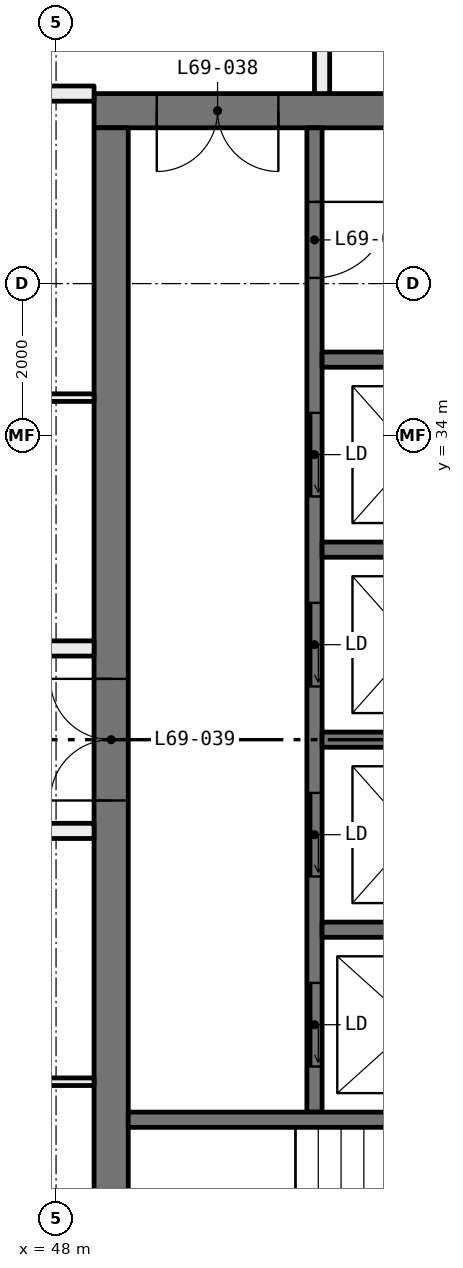
"""IFC4 building model, lengths in metres.
Left out: names, types, materials, properties, quantities, classifications, styles, units other than length and angle.
Written with IfcOpenShell. Run it as: python <this file> out.ifc"""

import sys

from ifc_helpers import new_model, si_unit, direction, frame, frame_2d, origin, place, context, subcontext, project, spatial, rectangle, extrude, element, fill, save


model = new_model("IFC4")
c1 = context("Model", 3, precision=1e-05, world=origin(), true_north=direction((0.0, 1.0)))
c2 = subcontext(c1, "Body", "Model", "MODEL_VIEW")
j1 = project(units=[si_unit("LENGTHUNIT", "METRE"), si_unit("PLANEANGLEUNIT", "RADIAN")], contexts=[c1])
p1 = place(None, origin())
s1 = spatial("IfcSite", under=j1, at=p1, CompositionType="ELEMENT")
p2 = place(p1, origin())
s2 = spatial("IfcBuilding", under=s1, at=p2, CompositionType="ELEMENT")
p3 = place(p2, frame((0.0, 0.0, 255.9)))
s3 = spatial("IfcBuildingStorey", under=s2, at=p3, CompositionType="ELEMENT", Elevation=255.9)
p4 = place(p3, frame((48.5, 25.5, 0.0), z_axis=(0.0, 0.0, 1.0), x_axis=(-1.0, 0.0, 0.0)))
e1 = element("IfcWall", 1, at=p4, inside=s3, PredefinedType="PARTITIONING", context=c2, shape_type="SweptSolid", body=[
    extrude(rectangle(XDim=6.45, YDim=0.1, at=frame_2d((3.225, 0.0))), origin(), (0.0, 0.0, 1.0), 3.05),
])
p5 = place(p4, frame((2.775, 0.0, 0.0)))
e2 = element("IfcOpeningElement", 2, at=p5, cuts=e1, PredefinedType="OPENING", context=c2, shape_type="SweptSolid", body=[
    extrude(rectangle(XDim=0.9, YDim=2.1, at=frame_2d((0.45, 1.05))), frame((0.0, 0.06, 0.0), z_axis=(0.0, -1.0, 0.0), x_axis=(1.0, 0.0, 0.0)), (0.0, 0.0, 1.0), 0.12),
])
p6 = place(p3, frame((48.5, 28.8, 0.0), z_axis=(0.0, 0.0, 1.0), x_axis=(-1.0, 0.0, 0.0)))
e3 = element("IfcWall", 3, at=p6, inside=s3, PredefinedType="PARTITIONING", context=c2, shape_type="SweptSolid", body=[
    extrude(rectangle(XDim=2.4, YDim=0.2, at=frame_2d((1.2, 0.0))), origin(), (0.0, 0.0, 1.0), 3.05),
])
p7 = place(p3, frame((51.5, 41.9, 0.0), z_axis=(0.0, 0.0, 1.0), x_axis=(0.0, -1.0, 0.0)))
e4 = element("IfcWall", 4, at=p7, inside=s3, PredefinedType="PARTITIONING", context=c2, shape_type="SweptSolid", body=[
    extrude(rectangle(XDim=3.4, YDim=0.2, at=frame_2d((1.7, 0.0))), origin(), (0.0, 0.0, 1.0), 3.05),
])
p8 = place(p7, frame((1.2, 0.0, 0.0)))
e5 = element("IfcOpeningElement", 5, at=p8, cuts=e4, PredefinedType="OPENING", context=c2, shape_type="SweptSolid", body=[
    extrude(rectangle(XDim=1.0, YDim=2.1, at=frame_2d((0.5, 1.05))), frame((0.0, 0.11, 0.0), z_axis=(0.0, -1.0, 0.0), x_axis=(1.0, 0.0, 0.0)), (0.0, 0.0, 1.0), 0.22),
])
p9 = place(p3, frame((42.05, 34.5, 0.0), z_axis=(0.0, 0.0, 1.0), x_axis=(1.0, 0.0, 0.0)))
e6 = element("IfcWall", 6, at=p9, inside=s3, PredefinedType="PARTITIONING", context=c2, shape_type="SweptSolid", body=[
    extrude(rectangle(XDim=6.45, YDim=0.1, at=frame_2d((3.225, 0.0))), origin(), (0.0, 0.0, 1.0), 3.05),
])
p10 = place(p9, frame((2.775, 0.0, 0.0)))
e7 = element("IfcOpeningElement", 7, at=p10, cuts=e6, PredefinedType="OPENING", context=c2, shape_type="SweptSolid", body=[
    extrude(rectangle(XDim=0.9, YDim=2.1, at=frame_2d((0.45, 1.05))), frame((0.0, 0.06, 0.0), z_axis=(0.0, -1.0, 0.0), x_axis=(1.0, 0.0, 0.0)), (0.0, 0.0, 1.0), 0.12),
])
p11 = place(p3, frame((48.5, 38.5, 0.0), z_axis=(0.0, 0.0, 1.0), x_axis=(-1.0, 0.0, 0.0)))
e8 = element("IfcWall", 8, at=p11, inside=s3, PredefinedType="PARTITIONING", context=c2, shape_type="SweptSolid", body=[
    extrude(rectangle(XDim=2.4, YDim=0.2, at=frame_2d((1.2, 0.0))), origin(), (0.0, 0.0, 1.0), 3.05),
])
p12 = place(p3, frame((46.2, 31.2, 0.0), z_axis=(0.0, 0.0, 1.0), x_axis=(1.0, 0.0, 0.0)))
e9 = element("IfcWall", 9, at=p12, inside=s3, PredefinedType="PARTITIONING", context=c2, shape_type="SweptSolid", body=[
    extrude(rectangle(XDim=2.3, YDim=0.2, at=frame_2d((1.15, 0.0))), origin(), (0.0, 0.0, 1.0), 3.05),
])
p13 = place(p3, frame((59.5, 38.275, 0.0), z_axis=(0.0, 0.0, 1.0), x_axis=(-1.0, 0.0, 0.0)))
e10 = element("IfcWall", 10, at=p13, inside=s3, PredefinedType="SHEAR", context=c2, shape_type="SweptSolid", body=[
    extrude(rectangle(XDim=11.0, YDim=0.45, at=frame_2d((5.5, 0.0))), origin(), (0.0, 0.0, 1.0), 3.05),
])
p14 = place(p13, frame((8.575, 0.0, 0.0)))
e11 = element("IfcOpeningElement", 11, at=p14, cuts=e10, PredefinedType="OPENING", context=c2, shape_type="SweptSolid", body=[
    extrude(rectangle(XDim=1.6, YDim=2.1, at=frame_2d((0.8, 1.05))), frame((0.0, 0.235, 0.0), z_axis=(0.0, -1.0, 0.0), x_axis=(1.0, 0.0, 0.0)), (0.0, 0.0, 1.0), 0.47),
])
p15 = place(p3, frame((48.725, 21.95, 0.0), z_axis=(0.0, 0.0, 1.0), x_axis=(0.0, 1.0, 0.0)))
e12 = element("IfcWall", 12, at=p15, inside=s3, PredefinedType="SHEAR", context=c2, shape_type="SweptSolid", body=[
    extrude(rectangle(XDim=16.1, YDim=0.45, at=frame_2d((8.05, 0.0))), origin(), (0.0, 0.0, 1.0), 3.05),
])
p16 = place(p15, frame((7.25, 0.0, 0.0)))
e13 = element("IfcOpeningElement", 13, at=p16, cuts=e12, PredefinedType="OPENING", context=c2, shape_type="SweptSolid", body=[
    extrude(rectangle(XDim=1.6, YDim=2.1, at=frame_2d((0.8, 1.05))), frame((0.0, 0.235, 0.0), z_axis=(0.0, -1.0, 0.0), x_axis=(1.0, 0.0, 0.0)), (0.0, 0.0, 1.0), 0.47),
])
p17 = place(p3, frame((51.4, 25.1, 0.0), z_axis=(0.0, 0.0, 1.0), x_axis=(0.0, 1.0, 0.0)))
e14 = element("IfcWall", 14, at=p17, inside=s3, PredefinedType="SOLIDWALL", context=c2, shape_type="SweptSolid", body=[
    extrude(rectangle(XDim=12.95, YDim=0.2, at=frame_2d((6.475, 0.0))), origin(), (0.0, 0.0, 1.0), 3.05),
])
p18 = place(p17, frame((0.6, 0.0, 0.0)))
e15 = element("IfcOpeningElement", 15, at=p18, cuts=e14, PredefinedType="OPENING", context=c2, shape_type="SweptSolid", body=[
    extrude(rectangle(XDim=1.1, YDim=2.1, at=frame_2d((0.55, 1.05))), frame((0.0, 0.11, 0.0), z_axis=(0.0, -1.0, 0.0), x_axis=(1.0, 0.0, 0.0)), (0.0, 0.0, 1.0), 0.22),
])
p19 = place(p17, frame((3.1, 0.0, 0.0)))
e16 = element("IfcOpeningElement", 16, at=p19, cuts=e14, PredefinedType="OPENING", context=c2, shape_type="SweptSolid", body=[
    extrude(rectangle(XDim=1.1, YDim=2.1, at=frame_2d((0.55, 1.05))), frame((0.0, 0.11, 0.0), z_axis=(0.0, -1.0, 0.0), x_axis=(1.0, 0.0, 0.0)), (0.0, 0.0, 1.0), 0.22),
])
p20 = place(p17, frame((5.6, 0.0, 0.0)))
e17 = element("IfcOpeningElement", 17, at=p20, cuts=e14, PredefinedType="OPENING", context=c2, shape_type="SweptSolid", body=[
    extrude(rectangle(XDim=1.1, YDim=2.1, at=frame_2d((0.55, 1.05))), frame((0.0, 0.11, 0.0), z_axis=(0.0, -1.0, 0.0), x_axis=(1.0, 0.0, 0.0)), (0.0, 0.0, 1.0), 0.22),
])
p21 = place(p17, frame((8.1, 0.0, 0.0)))
e18 = element("IfcOpeningElement", 18, at=p21, cuts=e14, PredefinedType="OPENING", context=c2, shape_type="SweptSolid", body=[
    extrude(rectangle(XDim=1.1, YDim=2.1, at=frame_2d((0.55, 1.05))), frame((0.0, 0.11, 0.0), z_axis=(0.0, -1.0, 0.0), x_axis=(1.0, 0.0, 0.0)), (0.0, 0.0, 1.0), 0.22),
])
p22 = place(p17, frame((10.975, 0.0, 0.0)))
e19 = element("IfcOpeningElement", 19, at=p22, cuts=e14, PredefinedType="OPENING", context=c2, shape_type="SweptSolid", body=[
    extrude(rectangle(XDim=1.0, YDim=2.1, at=frame_2d((0.5, 1.05))), frame((0.0, 0.11, 0.0), z_axis=(0.0, -1.0, 0.0), x_axis=(1.0, 0.0, 0.0)), (0.0, 0.0, 1.0), 0.22),
])
for number, where, z_axis, x_axis in (
    (20, (56.5, 25.0, 0.0), (0.0, 0.0, 1.0), (-1.0, 0.0, 0.0)),
    (21, (59.05, 35.0, 0.0), (0.0, 0.0, 1.0), (-1.0, 0.0, 0.0)),
):
    element("IfcWall", number, at=place(p3, frame(where, z_axis=z_axis, x_axis=x_axis)), inside=s3, PredefinedType="SOLIDWALL", context=c2, shape_type="SweptSolid", body=[
        extrude(rectangle(XDim=7.55, YDim=0.2, at=frame_2d((3.775, 0.0))), origin(), (0.0, 0.0, 1.0), 3.05),
    ])
for number, where, z_axis, x_axis in (
    (22, (53.9, 27.5, 0.0), (0.0, 0.0, 1.0), (-1.0, 0.0, 0.0)),
    (23, (53.9, 30.0, 0.0), (0.0, 0.0, 1.0), (-1.0, 0.0, 0.0)),
    (24, (53.9, 32.5, 0.0), (0.0, 0.0, 1.0), (-1.0, 0.0, 0.0)),
):
    element("IfcWall", number, at=place(p3, frame(where, z_axis=z_axis, x_axis=x_axis)), inside=s3, PredefinedType="SOLIDWALL", context=c2, shape_type="SweptSolid", body=[
        extrude(rectangle(XDim=2.4, YDim=0.2, at=frame_2d((1.2, 0.0))), origin(), (0.0, 0.0, 1.0), 3.05),
    ])
p23 = place(p18, origin())
e25 = element("IfcDoor", 25, at=p23, inside=s3, OperationType="SLIDING_TO_LEFT", PredefinedType="DOOR", context=c2, shape_type="SweptSolid", body=[
    extrude(rectangle(XDim=1.1, YDim=2.1, at=frame_2d((0.55, 1.05))), frame((0.0, 0.025, 0.0), z_axis=(0.0, -1.0, 0.0), x_axis=(1.0, 0.0, 0.0)), (0.0, 0.0, 1.0), 0.05),
])
fill(e15, e25)
p24 = place(p19, origin())
e26 = element("IfcDoor", 26, at=p24, inside=s3, OperationType="SLIDING_TO_LEFT", PredefinedType="DOOR", context=c2, shape_type="SweptSolid", body=[
    extrude(rectangle(XDim=1.1, YDim=2.1, at=frame_2d((0.55, 1.05))), frame((0.0, 0.025, 0.0), z_axis=(0.0, -1.0, 0.0), x_axis=(1.0, 0.0, 0.0)), (0.0, 0.0, 1.0), 0.05),
])
fill(e16, e26)
p25 = place(p20, origin())
e27 = element("IfcDoor", 27, at=p25, inside=s3, OperationType="SLIDING_TO_LEFT", PredefinedType="DOOR", context=c2, shape_type="SweptSolid", body=[
    extrude(rectangle(XDim=1.1, YDim=2.1, at=frame_2d((0.55, 1.05))), frame((0.0, 0.025, 0.0), z_axis=(0.0, -1.0, 0.0), x_axis=(1.0, 0.0, 0.0)), (0.0, 0.0, 1.0), 0.05),
])
fill(e17, e27)
p26 = place(p21, origin())
e28 = element("IfcDoor", 28, at=p26, inside=s3, OperationType="SLIDING_TO_LEFT", PredefinedType="DOOR", context=c2, shape_type="SweptSolid", body=[
    extrude(rectangle(XDim=1.1, YDim=2.1, at=frame_2d((0.55, 1.05))), frame((0.0, 0.025, 0.0), z_axis=(0.0, -1.0, 0.0), x_axis=(1.0, 0.0, 0.0)), (0.0, 0.0, 1.0), 0.05),
])
fill(e18, e28)
p27 = place(p22, frame((1.0, 0.0, 0.0), x_axis=(-1.0, 0.0, 0.0)))
e29 = element("IfcDoor", 29, at=p27, inside=s3, OperationType="SINGLE_SWING_RIGHT", PredefinedType="DOOR", context=c2, shape_type="SweptSolid", body=[
    extrude(rectangle(XDim=1.0, YDim=2.1, at=frame_2d((0.5, 1.05))), frame((0.0, 0.025, 0.0), z_axis=(0.0, -1.0, 0.0), x_axis=(1.0, 0.0, 0.0)), (0.0, 0.0, 1.0), 0.05),
])
fill(e19, e29)
p28 = place(p14, origin())
e30 = element("IfcDoor", 30, at=p28, inside=s3, OperationType="DOUBLE_DOOR_SINGLE_SWING", PredefinedType="DOOR", context=c2, shape_type="SweptSolid", body=[
    extrude(rectangle(XDim=1.6, YDim=2.1, at=frame_2d((0.8, 1.05))), frame((0.0, 0.025, 0.0), z_axis=(0.0, -1.0, 0.0), x_axis=(1.0, 0.0, 0.0)), (0.0, 0.0, 1.0), 0.05),
])
fill(e11, e30)
p29 = place(p16, origin())
e31 = element("IfcDoor", 31, at=p29, inside=s3, OperationType="DOUBLE_DOOR_SINGLE_SWING", PredefinedType="DOOR", context=c2, shape_type="SweptSolid", body=[
    extrude(rectangle(XDim=1.6, YDim=2.1, at=frame_2d((0.8, 1.05))), frame((0.0, 0.025, 0.0), z_axis=(0.0, -1.0, 0.0), x_axis=(1.0, 0.0, 0.0)), (0.0, 0.0, 1.0), 0.05),
])
fill(e13, e31)
save(model, sys.argv[1])
